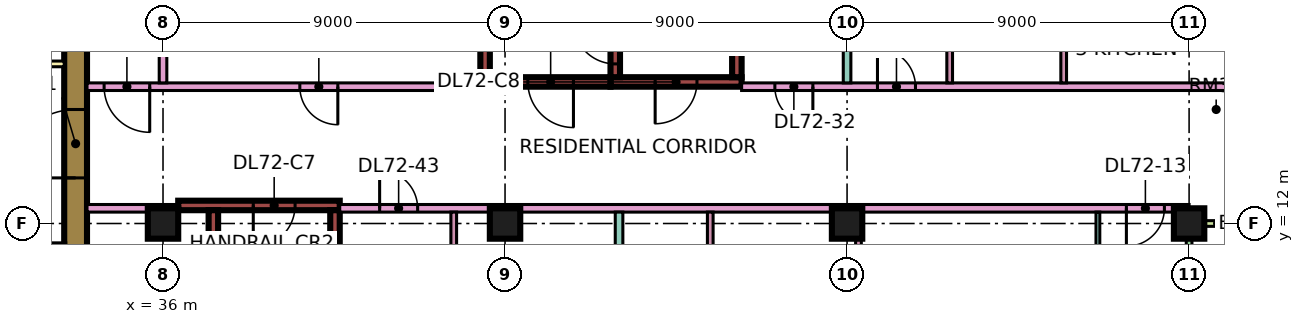
"""IFC4 building model, lengths in metres.
Left out: names, types, materials, properties, quantities, classifications, styles, units other than length and angle.
Written with IfcOpenShell. Run it as: python <this file> out.ifc"""

import sys

from ifc_helpers import new_model, si_unit, direction, frame, frame_2d, origin, origin_2d, place, context, subcontext, project, spatial, rectangle, extrude, element, fill, save


model = new_model("IFC4")
c1 = context("Model", 3, precision=1e-05, world=origin(), true_north=direction((0.0, 1.0)))
c2 = subcontext(c1, "Body", "Model", "MODEL_VIEW")
j1 = project(units=[si_unit("LENGTHUNIT", "METRE"), si_unit("PLANEANGLEUNIT", "RADIAN")], contexts=[c1])
p1 = place(None, origin())
s1 = spatial("IfcSite", under=j1, at=p1, CompositionType="ELEMENT")
p2 = place(p1, origin())
s2 = spatial("IfcBuilding", under=s1, at=p2, CompositionType="ELEMENT")
p3 = place(p2, frame((0.0, 0.0, 307.15)))
s3 = spatial("IfcBuildingStorey", under=s2, at=p3, CompositionType="ELEMENT", Elevation=307.15)
for number, where, z_axis, x_axis in (
    (1, (36.0, 12.0, 0.0), (0.0, 0.0, 1.0), (1.0, 0.0, 0.0)),
    (2, (45.0, 12.0, 0.0), (0.0, 0.0, 1.0), (1.0, 0.0, 0.0)),
    (3, (54.0, 12.0, 0.0), (0.0, 0.0, 1.0), (1.0, 0.0, 0.0)),
    (4, (63.0, 12.0, 0.0), (0.0, 0.0, 1.0), (1.0, 0.0, 0.0)),
):
    element("IfcColumn", number, at=place(p3, frame(where, z_axis=z_axis, x_axis=x_axis)), inside=s3, PredefinedType="COLUMN", context=c2, shape_type="SweptSolid", body=[
        extrude(rectangle(XDim=0.8, YDim=0.8, at=origin_2d()), origin(), (0.0, 0.0, 1.0), 3.75),
    ])
p4 = place(p3, frame((33.7, 7.6, 0.0), z_axis=(0.0, 0.0, 1.0), x_axis=(0.0, 1.0, 0.0)))
e5 = element("IfcWall", 5, at=p4, inside=s3, PredefinedType="SHEAR", context=c2, shape_type="SweptSolid", body=[
    extrude(rectangle(XDim=11.8, YDim=0.6, at=frame_2d((5.9, 0.0))), origin(), (0.0, 0.0, 1.0), 3.75),
])
p5 = place(p4, frame((5.6, 0.0, 0.0)))
e6 = element("IfcOpeningElement", 6, at=p5, cuts=e5, PredefinedType="OPENING", context=c2, shape_type="SweptSolid", body=[
    extrude(rectangle(XDim=1.8, YDim=2.4, at=frame_2d((0.9, 1.2))), frame((0.0, 0.31, 0.0), z_axis=(0.0, -1.0, 0.0), x_axis=(1.0, 0.0, 0.0)), (0.0, 0.0, 1.0), 0.62),
])
p6 = place(p3, frame((36.4, 12.475, 0.0), z_axis=(0.0, 0.0, 1.0), x_axis=(1.0, 0.0, 0.0)))
e7 = element("IfcWall", 7, at=p6, inside=s3, PredefinedType="SHEAR", context=c2, shape_type="SweptSolid", body=[
    extrude(rectangle(XDim=4.25, YDim=0.25, at=frame_2d((2.125, 0.0))), origin(), (0.0, 0.0, 1.0), 3.75),
])
p7 = place(p6, frame((1.975, 0.0, 0.0)))
e8 = element("IfcOpeningElement", 8, at=p7, cuts=e7, PredefinedType="OPENING", context=c2, shape_type="SweptSolid", body=[
    extrude(rectangle(XDim=1.1, YDim=2.2, at=frame_2d((0.55, 1.1))), frame((0.0, 0.135, 0.0), z_axis=(0.0, -1.0, 0.0), x_axis=(1.0, 0.0, 0.0)), (0.0, 0.0, 1.0), 0.27),
])
for number, where, z_axis, x_axis in (
    (9, (37.325, 5.85, 0.0), (0.0, 0.0, 1.0), (0.0, 1.0, 0.0)),
    (10, (40.525, 5.85, 0.0), (0.0, 0.0, 1.0), (0.0, 1.0, 0.0)),
):
    element("IfcWall", number, at=place(p3, frame(where, z_axis=z_axis, x_axis=x_axis)), inside=s3, PredefinedType="SHEAR", context=c2, shape_type="SweptSolid", body=[
        extrude(rectangle(XDim=6.5, YDim=0.25, at=frame_2d((3.25, 0.0))), origin(), (0.0, 0.0, 1.0), 3.75),
    ])
p8 = place(p3, frame((47.775, 15.725, 0.0), z_axis=(0.0, 0.0, 1.0), x_axis=(1.0, 0.0, 0.0)))
e11 = element("IfcWall", 11, at=p8, inside=s3, PredefinedType="SHEAR", context=c2, shape_type="SweptSolid", body=[
    extrude(rectangle(XDim=3.45, YDim=0.25, at=frame_2d((1.725, 0.0))), origin(), (0.0, 0.0, 1.0), 3.75),
])
p9 = place(p8, frame((1.175, 0.0, 0.0)))
e12 = element("IfcOpeningElement", 12, at=p9, cuts=e11, PredefinedType="OPENING", context=c2, shape_type="SweptSolid", body=[
    extrude(rectangle(XDim=1.1, YDim=2.2, at=frame_2d((0.55, 1.1))), frame((0.0, 0.135, 0.0), z_axis=(0.0, -1.0, 0.0), x_axis=(1.0, 0.0, 0.0)), (0.0, 0.0, 1.0), 0.27),
])
p10 = place(p3, frame((47.9, 15.85, 0.0), z_axis=(0.0, 0.0, 1.0), x_axis=(0.0, 1.0, 0.0)))
e13 = element("IfcWall", 13, at=p10, inside=s3, PredefinedType="SHEAR", context=c2, shape_type="SweptSolid", body=[
    extrude(rectangle(XDim=6.5, YDim=0.25, at=frame_2d((3.25, 0.0))), origin(), (0.0, 0.0, 1.0), 3.75),
])
p11 = place(p10, frame((0.35, 0.0, 0.0)))
e14 = element("IfcOpeningElement", 14, at=p11, cuts=e13, PredefinedType="OPENING", context=c2, shape_type="SweptSolid", body=[
    extrude(rectangle(XDim=1.1, YDim=2.2, at=frame_2d((0.55, 1.1))), frame((0.0, 0.135, 0.0), z_axis=(0.0, -1.0, 0.0), x_axis=(1.0, 0.0, 0.0)), (0.0, 0.0, 1.0), 0.27),
])
p12 = place(p3, frame((51.1, 15.85, 0.0), z_axis=(0.0, 0.0, 1.0), x_axis=(0.0, 1.0, 0.0)))
e15 = element("IfcWall", 15, at=p12, inside=s3, PredefinedType="SHEAR", context=c2, shape_type="SweptSolid", body=[
    extrude(rectangle(XDim=6.5, YDim=0.25, at=frame_2d((3.25, 0.0))), origin(), (0.0, 0.0, 1.0), 3.75),
])
p13 = place(p3, frame((44.35, 15.725, 0.0), z_axis=(0.0, 0.0, 1.0), x_axis=(1.0, 0.0, 0.0)))
e16 = element("IfcWall", 16, at=p13, inside=s3, PredefinedType="SHEAR", context=c2, shape_type="SweptSolid", body=[
    extrude(rectangle(XDim=3.425, YDim=0.25, at=frame_2d((1.712, 0.0))), origin(), (0.0, 0.0, 1.0), 3.75),
])
p14 = place(p13, frame((1.25, 0.0, 0.0)))
e17 = element("IfcOpeningElement", 17, at=p14, cuts=e16, PredefinedType="OPENING", context=c2, shape_type="SweptSolid", body=[
    extrude(rectangle(XDim=1.2, YDim=2.2, at=frame_2d((0.6, 1.1))), frame((0.0, 0.135, 0.0), z_axis=(0.0, -1.0, 0.0), x_axis=(1.0, 0.0, 0.0)), (0.0, 0.0, 1.0), 0.27),
])
p15 = place(p3, frame((44.475, 15.85, 0.0), z_axis=(0.0, 0.0, 1.0), x_axis=(0.0, 1.0, 0.0)))
e18 = element("IfcWall", 18, at=p15, inside=s3, PredefinedType="SHEAR", context=c2, shape_type="SweptSolid", body=[
    extrude(rectangle(XDim=6.5, YDim=0.25, at=frame_2d((3.25, 0.0))), origin(), (0.0, 0.0, 1.0), 3.75),
])
p16 = place(p15, frame((1.75, 0.0, 0.0)))
e19 = element("IfcOpeningElement", 19, at=p16, cuts=e18, PredefinedType="OPENING", context=c2, shape_type="SweptSolid", body=[
    extrude(rectangle(XDim=1.1, YDim=2.2, at=frame_2d((0.55, 1.1))), frame((0.0, 0.135, 0.0), z_axis=(0.0, -1.0, 0.0), x_axis=(1.0, 0.0, 0.0)), (0.0, 0.0, 1.0), 0.27),
])
p17 = place(p15, frame((4.3, 0.0, 0.0)))
e20 = element("IfcOpeningElement", 20, at=p17, cuts=e18, PredefinedType="OPENING", context=c2, shape_type="SweptSolid", body=[
    extrude(rectangle(XDim=1.1, YDim=2.2, at=frame_2d((0.55, 1.1))), frame((0.0, 0.135, 0.0), z_axis=(0.0, -1.0, 0.0), x_axis=(1.0, 0.0, 0.0)), (0.0, 0.0, 1.0), 0.27),
])
p18 = place(p3, frame((63.0, 1.575, 0.0), z_axis=(0.0, 0.0, 1.0), x_axis=(0.0, 1.0, 0.0)))
e21 = element("IfcWall", 21, at=p18, inside=s3, PredefinedType="SOLIDWALL", context=c2, shape_type="SweptSolid", body=[
    extrude(rectangle(XDim=10.35, YDim=0.15, at=frame_2d((5.175, 0.0))), origin(), (0.0, 0.0, 1.0), 3.35),
])
p19 = place(p18, frame((4.062, 0.0, 0.0)))
e22 = element("IfcOpeningElement", 22, at=p19, cuts=e21, PredefinedType="OPENING", context=c2, shape_type="SweptSolid", body=[
    extrude(rectangle(XDim=1.8, YDim=2.4, at=frame_2d((0.9, 1.2))), frame((0.0, 0.085, 0.0), z_axis=(0.0, -1.0, 0.0), x_axis=(1.0, 0.0, 0.0)), (0.0, 0.0, 1.0), 0.17),
])
p20 = place(p3, frame((64.5, 12.0, 0.0), z_axis=(0.0, 0.0, 1.0), x_axis=(-1.0, 0.0, 0.0)))
e23 = element("IfcWall", 23, at=p20, inside=s3, PredefinedType="SOLIDWALL", context=c2, shape_type="SweptSolid", body=[
    extrude(rectangle(XDim=1.5, YDim=0.15, at=frame_2d((0.75, 0.0))), origin(), (0.0, 0.0, 1.0), 3.35),
])
p21 = place(p3, frame((31.4, 16.2, 0.0), z_axis=(0.0, 0.0, 1.0), x_axis=(1.0, 0.0, 0.0)))
e24 = element("IfcWall", 24, at=p21, inside=s3, PredefinedType="PARTITIONING", context=c2, shape_type="SweptSolid", body=[
    extrude(rectangle(XDim=2.0, YDim=0.15, at=frame_2d((1.0, 0.0))), origin(), (0.0, 0.0, 1.0), 3.35),
])
p22 = place(p3, frame((34.0, 12.4, 0.0), z_axis=(0.0, 0.0, 1.0), x_axis=(1.0, 0.0, 0.0)))
e25 = element("IfcWall", 25, at=p22, inside=s3, PredefinedType="PARTITIONING", context=c2, shape_type="SweptSolid", body=[
    extrude(rectangle(XDim=2.401, YDim=0.2, at=frame_2d((1.2, 0.0))), origin(), (0.0, 0.0, 1.0), 3.35),
])
p23 = place(p3, frame((34.0, 15.6, 0.0), z_axis=(0.0, 0.0, 1.0), x_axis=(1.0, 0.0, 0.0)))
e26 = element("IfcWall", 26, at=p23, inside=s3, PredefinedType="PARTITIONING", context=c2, shape_type="SweptSolid", body=[
    extrude(rectangle(XDim=10.35, YDim=0.2, at=frame_2d((5.175, 0.0))), origin(), (0.0, 0.0, 1.0), 3.35),
])
p24 = place(p23, frame((5.6, 0.0, 0.0)))
e27 = element("IfcOpeningElement", 27, at=p24, cuts=e26, PredefinedType="OPENING", context=c2, shape_type="SweptSolid", body=[
    extrude(rectangle(XDim=1.0, YDim=2.1, at=frame_2d((0.5, 1.05))), frame((0.0, 0.11, 0.0), z_axis=(0.0, -1.0, 0.0), x_axis=(1.0, 0.0, 0.0)), (0.0, 0.0, 1.0), 0.22),
])
p25 = place(p23, frame((0.45, 0.0, 0.0)))
e28 = element("IfcOpeningElement", 28, at=p25, cuts=e26, PredefinedType="OPENING", context=c2, shape_type="SweptSolid", body=[
    extrude(rectangle(XDim=1.2, YDim=2.1, at=frame_2d((0.6, 1.05))), frame((0.0, 0.11, 0.0), z_axis=(0.0, -1.0, 0.0), x_axis=(1.0, 0.0, 0.0)), (0.0, 0.0, 1.0), 0.22),
])
p26 = place(p3, frame((36.0, 15.7, 0.0), z_axis=(0.0, 0.0, 1.0), x_axis=(0.0, 1.0, 0.0)))
e29 = element("IfcWall", 29, at=p26, inside=s3, PredefinedType="PARTITIONING", context=c2, shape_type="SweptSolid", body=[
    extrude(rectangle(XDim=8.3, YDim=0.2, at=frame_2d((4.15, 0.0))), origin(), (0.0, 0.0, 1.0), 3.35),
])
p27 = place(p3, frame((40.65, 12.4, 0.0), z_axis=(0.0, 0.0, 1.0), x_axis=(1.0, 0.0, 0.0)))
e30 = element("IfcWall", 30, at=p27, inside=s3, PredefinedType="PARTITIONING", context=c2, shape_type="SweptSolid", body=[
    extrude(rectangle(XDim=22.35, YDim=0.2, at=frame_2d((11.175, 0.0))), origin(), (0.0, 0.0, 1.0), 3.35),
])
p28 = place(p27, frame((20.7, 0.0, 0.0)))
e31 = element("IfcOpeningElement", 31, at=p28, cuts=e30, PredefinedType="OPENING", context=c2, shape_type="SweptSolid", body=[
    extrude(rectangle(XDim=1.0, YDim=2.1, at=frame_2d((0.5, 1.05))), frame((0.0, 0.11, 0.0), z_axis=(0.0, -1.0, 0.0), x_axis=(1.0, 0.0, 0.0)), (0.0, 0.0, 1.0), 0.22),
])
p29 = place(p27, frame((1.05, 0.0, 0.0)))
e32 = element("IfcOpeningElement", 32, at=p29, cuts=e30, PredefinedType="OPENING", context=c2, shape_type="SweptSolid", body=[
    extrude(rectangle(XDim=1.0, YDim=2.1, at=frame_2d((0.5, 1.05))), frame((0.0, 0.11, 0.0), z_axis=(0.0, -1.0, 0.0), x_axis=(1.0, 0.0, 0.0)), (0.0, 0.0, 1.0), 0.22),
])
p30 = place(p3, frame((43.65, 5.825, 0.0), z_axis=(0.0, 0.0, 1.0), x_axis=(0.0, 1.0, 0.0)))
e33 = element("IfcWall", 33, at=p30, inside=s3, PredefinedType="PARTITIONING", context=c2, shape_type="SweptSolid", body=[
    extrude(rectangle(XDim=6.475, YDim=0.15, at=frame_2d((3.238, 0.0))), origin(), (0.0, 0.0, 1.0), 3.35),
])
p31 = place(p30, frame((4.425, 0.0, 0.0)))
e34 = element("IfcOpeningElement", 34, at=p31, cuts=e33, PredefinedType="OPENING", context=c2, shape_type="SweptSolid", body=[
    extrude(rectangle(XDim=0.9, YDim=2.1, at=frame_2d((0.45, 1.05))), frame((0.0, 0.085, 0.0), z_axis=(0.0, -1.0, 0.0), x_axis=(1.0, 0.0, 0.0)), (0.0, 0.0, 1.0), 0.17),
])
p32 = place(p3, frame((48.0, 0.0, 0.0), z_axis=(0.0, 0.0, 1.0), x_axis=(0.0, 1.0, 0.0)))
e35 = element("IfcWall", 35, at=p32, inside=s3, PredefinedType="PARTITIONING", context=c2, shape_type="SweptSolid", body=[
    extrude(rectangle(XDim=12.3, YDim=0.2, at=frame_2d((6.15, 0.0))), origin(), (0.0, 0.0, 1.0), 3.35),
])
p33 = place(p3, frame((50.4, 7.675, 0.0), z_axis=(0.0, 0.0, 1.0), x_axis=(0.0, 1.0, 0.0)))
e36 = element("IfcWall", 36, at=p33, inside=s3, PredefinedType="PARTITIONING", context=c2, shape_type="SweptSolid", body=[
    extrude(rectangle(XDim=4.625, YDim=0.15, at=frame_2d((2.312, 0.0))), origin(), (0.0, 0.0, 1.0), 3.35),
])
p34 = place(p3, frame((51.225, 15.6, 0.0), z_axis=(0.0, 0.0, 1.0), x_axis=(1.0, 0.0, 0.0)))
e37 = element("IfcWall", 37, at=p34, inside=s3, PredefinedType="PARTITIONING", context=c2, shape_type="SweptSolid", body=[
    extrude(rectangle(XDim=13.125, YDim=0.2, at=frame_2d((6.562, 0.0))), origin(), (0.0, 0.0, 1.0), 3.35),
])
p35 = place(p34, frame((3.575, 0.0, 0.0)))
e38 = element("IfcOpeningElement", 38, at=p35, cuts=e37, PredefinedType="OPENING", context=c2, shape_type="SweptSolid", body=[
    extrude(rectangle(XDim=1.0, YDim=2.1, at=frame_2d((0.5, 1.05))), frame((0.0, 0.11, 0.0), z_axis=(0.0, -1.0, 0.0), x_axis=(1.0, 0.0, 0.0)), (0.0, 0.0, 1.0), 0.22),
])
p36 = place(p34, frame((0.875, 0.0, 0.0)))
e39 = element("IfcOpeningElement", 39, at=p36, cuts=e37, PredefinedType="OPENING", context=c2, shape_type="SweptSolid", body=[
    extrude(rectangle(XDim=1.0, YDim=2.1, at=frame_2d((0.5, 1.05))), frame((0.0, 0.11, 0.0), z_axis=(0.0, -1.0, 0.0), x_axis=(1.0, 0.0, 0.0)), (0.0, 0.0, 1.0), 0.22),
])
p37 = place(p3, frame((54.0, 15.7, 0.0), z_axis=(0.0, 0.0, 1.0), x_axis=(0.0, 1.0, 0.0)))
e40 = element("IfcWall", 40, at=p37, inside=s3, PredefinedType="PARTITIONING", context=c2, shape_type="SweptSolid", body=[
    extrude(rectangle(XDim=8.226, YDim=0.2, at=frame_2d((4.113, 0.0))), origin(), (0.0, 0.0, 1.0), 3.35),
])
p38 = place(p3, frame((54.3, 7.675, 0.0), z_axis=(0.0, 0.0, 1.0), x_axis=(0.0, 1.0, 0.0)))
e41 = element("IfcWall", 41, at=p38, inside=s3, PredefinedType="PARTITIONING", context=c2, shape_type="SweptSolid", body=[
    extrude(rectangle(XDim=4.625, YDim=0.15, at=frame_2d((2.312, 0.0))), origin(), (0.0, 0.0, 1.0), 3.35),
])
for number, where, z_axis, x_axis in (
    (42, (56.7, 15.7, 0.0), (0.0, 0.0, 1.0), (0.0, 1.0, 0.0)),
    (43, (59.7, 15.7, 0.0), (0.0, 0.0, 1.0), (0.0, 1.0, 0.0)),
):
    element("IfcWall", number, at=place(p3, frame(where, z_axis=z_axis, x_axis=x_axis)), inside=s3, PredefinedType="PARTITIONING", context=c2, shape_type="SweptSolid", body=[
        extrude(rectangle(XDim=2.525, YDim=0.15, at=frame_2d((1.263, 0.0))), origin(), (0.0, 0.0, 1.0), 3.35),
    ])
p39 = place(p3, frame((60.6, 7.675, 0.0), z_axis=(0.0, 0.0, 1.0), x_axis=(0.0, 1.0, 0.0)))
e44 = element("IfcWall", 44, at=p39, inside=s3, PredefinedType="PARTITIONING", context=c2, shape_type="SweptSolid", body=[
    extrude(rectangle(XDim=4.625, YDim=0.1, at=frame_2d((2.312, 0.0))), origin(), (0.0, 0.0, 1.0), 3.35),
])
p40 = place(p39, frame((1.875, 0.0, 0.0)))
e45 = element("IfcOpeningElement", 45, at=p40, cuts=e44, PredefinedType="OPENING", context=c2, shape_type="SweptSolid", body=[
    extrude(rectangle(XDim=0.9, YDim=2.1, at=frame_2d((0.45, 1.05))), frame((0.0, 0.06, 0.0), z_axis=(0.0, -1.0, 0.0), x_axis=(1.0, 0.0, 0.0)), (0.0, 0.0, 1.0), 0.12),
])
p41 = place(p5, origin())
e46 = element("IfcDoor", 46, at=p41, inside=s3, OperationType="DOUBLE_DOOR_SINGLE_SWING", PredefinedType="DOOR", context=c2, shape_type="SweptSolid", body=[
    extrude(rectangle(XDim=1.8, YDim=2.4, at=frame_2d((0.9, 1.2))), frame((0.0, 0.025, 0.0), z_axis=(0.0, -1.0, 0.0), x_axis=(1.0, 0.0, 0.0)), (0.0, 0.0, 1.0), 0.05),
])
fill(e6, e46)
p42 = place(p7, frame((1.1, 0.0, 0.0), z_axis=(0.0, 0.0, 1.0), x_axis=(-1.0, 0.0, 0.0)))
e47 = element("IfcDoor", 47, at=p42, inside=s3, OperationType="SINGLE_SWING_LEFT", PredefinedType="DOOR", context=c2, shape_type="SweptSolid", body=[
    extrude(rectangle(XDim=1.1, YDim=2.2, at=frame_2d((0.55, 1.1))), frame((0.0, 0.025, 0.0), z_axis=(0.0, -1.0, 0.0), x_axis=(1.0, 0.0, 0.0)), (0.0, 0.0, 1.0), 0.05),
])
fill(e8, e47)
p43 = place(p9, frame((1.1, 0.0, 0.0), z_axis=(0.0, 0.0, 1.0), x_axis=(-1.0, 0.0, 0.0)))
e48 = element("IfcDoor", 48, at=p43, inside=s3, OperationType="SINGLE_SWING_LEFT", PredefinedType="DOOR", context=c2, shape_type="SweptSolid", body=[
    extrude(rectangle(XDim=1.1, YDim=2.2, at=frame_2d((0.55, 1.1))), frame((0.0, 0.025, 0.0), z_axis=(0.0, -1.0, 0.0), x_axis=(1.0, 0.0, 0.0)), (0.0, 0.0, 1.0), 0.05),
])
fill(e12, e48)
p44 = place(p14, origin())
e49 = element("IfcDoor", 49, at=p44, inside=s3, OperationType="SINGLE_SWING_RIGHT", PredefinedType="DOOR", context=c2, shape_type="SweptSolid", body=[
    extrude(rectangle(XDim=1.2, YDim=2.2, at=frame_2d((0.6, 1.1))), frame((0.0, 0.025, 0.0), z_axis=(0.0, -1.0, 0.0), x_axis=(1.0, 0.0, 0.0)), (0.0, 0.0, 1.0), 0.05),
])
fill(e17, e49)
p45 = place(p11, frame((1.1, 0.0, 0.0), z_axis=(0.0, 0.0, 1.0), x_axis=(-1.0, 0.0, 0.0)))
e50 = element("IfcDoor", 50, at=p45, inside=s3, OperationType="SINGLE_SWING_RIGHT", PredefinedType="DOOR", context=c2, shape_type="SweptSolid", body=[
    extrude(rectangle(XDim=1.1, YDim=2.2, at=frame_2d((0.55, 1.1))), frame((0.0, 0.025, 0.0), z_axis=(0.0, -1.0, 0.0), x_axis=(1.0, 0.0, 0.0)), (0.0, 0.0, 1.0), 0.05),
])
fill(e14, e50)
p46 = place(p24, origin())
e51 = element("IfcDoor", 51, at=p46, inside=s3, OperationType="SINGLE_SWING_RIGHT", PredefinedType="DOOR", context=c2, shape_type="SweptSolid", body=[
    extrude(rectangle(XDim=1.0, YDim=2.1, at=frame_2d((0.5, 1.05))), frame((0.0, 0.025, 0.0), z_axis=(0.0, -1.0, 0.0), x_axis=(1.0, 0.0, 0.0)), (0.0, 0.0, 1.0), 0.05),
])
fill(e27, e51)
p47 = place(p35, origin())
e52 = element("IfcDoor", 52, at=p47, inside=s3, OperationType="SINGLE_SWING_LEFT", PredefinedType="DOOR", context=c2, shape_type="SweptSolid", body=[
    extrude(rectangle(XDim=1.0, YDim=2.1, at=frame_2d((0.5, 1.05))), frame((0.0, 0.025, 0.0), z_axis=(0.0, -1.0, 0.0), x_axis=(1.0, 0.0, 0.0)), (0.0, 0.0, 1.0), 0.05),
])
fill(e38, e52)
p48 = place(p28, frame((1.0, 0.0, 0.0), z_axis=(0.0, 0.0, 1.0), x_axis=(-1.0, 0.0, 0.0)))
e53 = element("IfcDoor", 53, at=p48, inside=s3, OperationType="SINGLE_SWING_LEFT", PredefinedType="DOOR", context=c2, shape_type="SweptSolid", body=[
    extrude(rectangle(XDim=1.0, YDim=2.1, at=frame_2d((0.5, 1.05))), frame((0.0, 0.025, 0.0), z_axis=(0.0, -1.0, 0.0), x_axis=(1.0, 0.0, 0.0)), (0.0, 0.0, 1.0), 0.05),
])
fill(e31, e53)
p49 = place(p25, origin())
e54 = element("IfcDoor", 54, at=p49, inside=s3, OperationType="SINGLE_SWING_RIGHT", PredefinedType="DOOR", context=c2, shape_type="SweptSolid", body=[
    extrude(rectangle(XDim=1.2, YDim=2.1, at=frame_2d((0.6, 1.05))), frame((0.0, 0.025, 0.0), z_axis=(0.0, -1.0, 0.0), x_axis=(1.0, 0.0, 0.0)), (0.0, 0.0, 1.0), 0.05),
])
fill(e28, e54)
p50 = place(p36, origin())
e55 = element("IfcDoor", 55, at=p50, inside=s3, OperationType="SINGLE_SWING_RIGHT", PredefinedType="DOOR", context=c2, shape_type="SweptSolid", body=[
    extrude(rectangle(XDim=1.0, YDim=2.1, at=frame_2d((0.5, 1.05))), frame((0.0, 0.025, 0.0), z_axis=(0.0, -1.0, 0.0), x_axis=(1.0, 0.0, 0.0)), (0.0, 0.0, 1.0), 0.05),
])
fill(e39, e55)
p51 = place(p29, origin())
e56 = element("IfcDoor", 56, at=p51, inside=s3, OperationType="SINGLE_SWING_LEFT", PredefinedType="DOOR", context=c2, shape_type="SweptSolid", body=[
    extrude(rectangle(XDim=1.0, YDim=2.1, at=frame_2d((0.5, 1.05))), frame((0.0, 0.025, 0.0), z_axis=(0.0, -1.0, 0.0), x_axis=(1.0, 0.0, 0.0)), (0.0, 0.0, 1.0), 0.05),
])
fill(e32, e56)
save(model, sys.argv[1])
